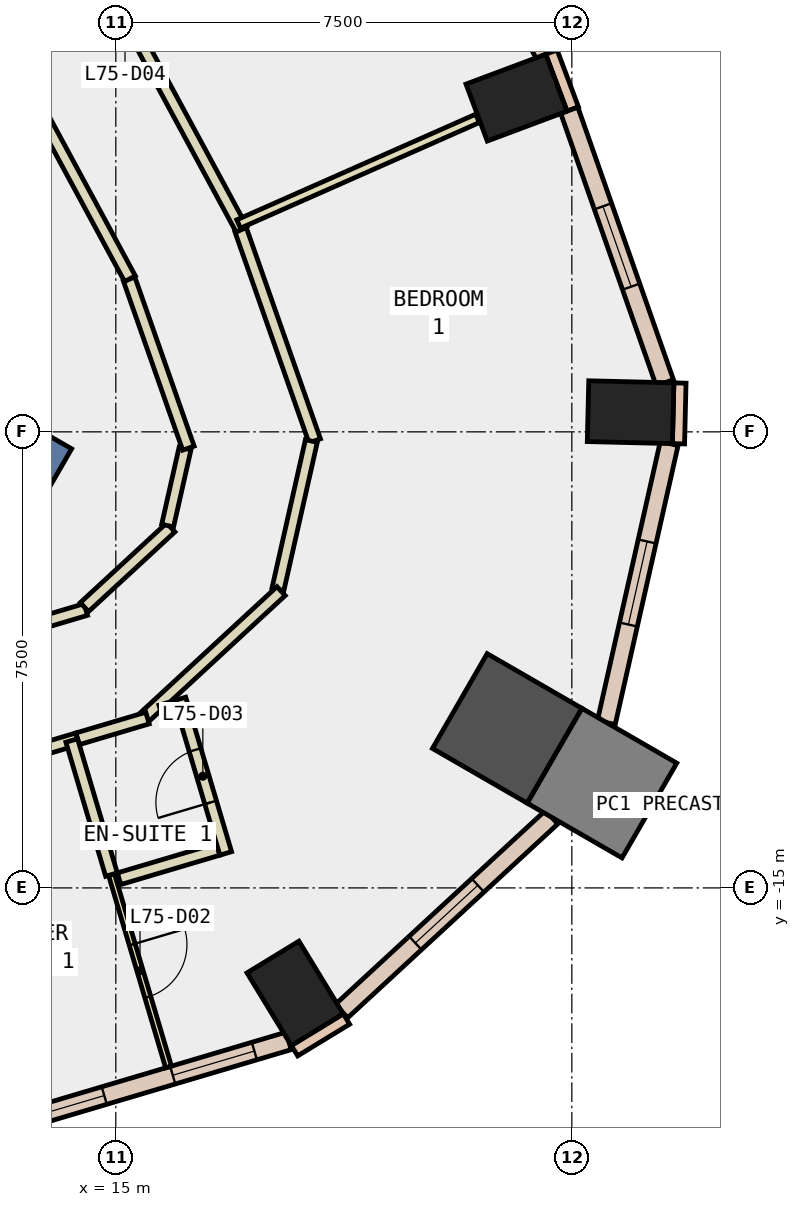
"""IFC4 building model, lengths in metres.
Left out: names, types, materials, properties, quantities, classifications, styles, units other than length and angle.
Written with IfcOpenShell. Run it as: python <this file> out.ifc"""

import sys

from ifc_helpers import new_model, si_unit, direction, frame, frame_2d, origin, origin_2d, place, context, subcontext, project, spatial, rectangle, extrude, element, fill, save


model = new_model("IFC4")
c1 = context("Model", 3, precision=1e-05, world=origin(), true_north=direction((0.0, 1.0)))
c2 = subcontext(c1, "Body", "Model", "MODEL_VIEW")
j1 = project(units=[si_unit("LENGTHUNIT", "METRE"), si_unit("PLANEANGLEUNIT", "RADIAN")], contexts=[c1])
p1 = place(None, origin())
s1 = spatial("IfcSite", under=j1, at=p1, CompositionType="ELEMENT")
p2 = place(p1, origin())
s2 = spatial("IfcBuilding", under=s1, at=p2, CompositionType="ELEMENT")
p3 = place(p2, frame((0.0, 0.0, 318.8)))
s3 = spatial("IfcBuildingStorey", under=s2, at=p3, CompositionType="ELEMENT", Elevation=318.8)
p4 = place(p3, frame((17.949, -16.734, -0.34), z_axis=(0.0, 0.0, 1.0), x_axis=(0.853650808213, 0.520845752251, 0.0)))
e1 = element("IfcColumn", 1, at=p4, inside=s3, PredefinedType="COLUMN", context=c2, shape_type="SweptSolid", body=[
    extrude(rectangle(XDim=1.0, YDim=1.4, at=origin_2d()), origin(), (0.0, 0.0, 1.0), 3.6),
])
p5 = place(p3, frame((21.437, -12.377, -0.34), z_axis=(0.0, 0.0, 1.0), x_axis=(-0.866025403784, 0.5, 0.0)))
e2 = element("IfcColumn", 2, at=p5, inside=s3, PredefinedType="COLUMN", context=c2, shape_type="SweptSolid", body=[
    extrude(rectangle(XDim=1.8, YDim=1.8, at=origin_2d()), origin(), (0.0, 0.0, 1.0), 3.6),
])
for number, where, z_axis, x_axis in (
    (3, (23.466, -7.177, -0.34), (0.0, 0.0, 1.0), (0.024, 1.0, 0.0)),
    (4, (21.59, -2.004, -0.34), (0.0, 0.0, 1.0), (-0.351, 0.936, 0.0)),
):
    element("IfcColumn", number, at=place(p3, frame(where, z_axis=z_axis, x_axis=x_axis)), inside=s3, PredefinedType="COLUMN", context=c2, shape_type="SweptSolid", body=[
        extrude(rectangle(XDim=1.0, YDim=1.4, at=origin_2d()), origin(), (0.0, 0.0, 1.0), 3.6),
    ])
p6 = place(p3, frame((22.996, -13.277, -0.34), z_axis=(0.0, 0.0, 1.0), x_axis=(-0.866025403784, 0.5, 0.0)))
e5 = element("IfcColumn", 5, at=p6, inside=s3, PredefinedType="COLUMN", context=c2, shape_type="SweptSolid", body=[
    extrude(rectangle(XDim=1.8, YDim=1.8, at=origin_2d()), origin(), (0.0, 0.0, 1.0), 3.6),
])
p7 = place(p3, frame((6.279, -3.625, -0.34), z_axis=(0.0, 0.0, 1.0), x_axis=(0.866017533419, -0.500013631625, 0.0)))
e6 = element("IfcWall", 6, at=p7, inside=s3, PredefinedType="SHEAR", context=c2, shape_type="SweptSolid", body=[
    extrude(rectangle(XDim=9.0, YDim=0.8, at=frame_2d((4.5, 0.0))), origin(), (0.0, 0.0, 1.0), 3.6),
])
p8 = place(p3, frame((22.515, -2.191, 0.0), z_axis=(0.0, 0.0, 1.0), x_axis=(-0.350962844851, 0.936389385637, 0.0)))
e7 = element("IfcWall", 7, at=p8, inside=s3, PredefinedType="STANDARD", context=c2, shape_type="SweptSolid", body=[
    extrude(rectangle(XDim=1.0, YDim=0.2, at=frame_2d((0.5, 0.0))), origin(), (0.0, 0.0, 1.0), 3.26),
])
p9 = place(p3, frame((17.939, -17.677, 0.0), z_axis=(0.0, 0.0, 1.0), x_axis=(0.853679739553, 0.520798331677, 0.0)))
e8 = element("IfcWall", 8, at=p9, inside=s3, PredefinedType="STANDARD", context=c2, shape_type="SweptSolid", body=[
    extrude(rectangle(XDim=1.0, YDim=0.2, at=frame_2d((0.5, 0.0))), origin(), (0.0, 0.0, 1.0), 3.26),
])
p10 = place(p3, frame((24.254, -7.696, 0.0), z_axis=(0.0, 0.0, 1.0), x_axis=(0.024186470916, 0.999707464524, 0.0)))
e9 = element("IfcWall", 9, at=p10, inside=s3, PredefinedType="STANDARD", context=c2, shape_type="SweptSolid", body=[
    extrude(rectangle(XDim=0.999, YDim=0.2, at=frame_2d((0.5, 0.0))), origin(), (0.0, 0.0, 1.0), 3.26),
])
p11 = place(p3, frame((12.904, -18.98, 0.0), z_axis=(0.0, 0.0, 1.0), x_axis=(0.958757933751, 0.284223898486, 0.0)))
e10 = element("IfcWall", 10, at=p11, inside=s3, PredefinedType="STANDARD", context=c2, shape_type="SweptSolid", body=[
    extrude(rectangle(XDim=5.15, YDim=0.3, at=frame_2d((2.575, 0.0))), origin(), (0.0, 0.0, 1.0), 3.26),
])
p12 = place(p11, frame((0.588, 0.0, 0.9)))
e11 = element("IfcOpeningElement", 11, at=p12, cuts=e10, PredefinedType="OPENING", context=c2, shape_type="SweptSolid", body=[
    extrude(rectangle(XDim=1.4, YDim=2.0, at=frame_2d((0.7, 1.0))), frame((0.0, 0.16, 0.0), z_axis=(0.0, -1.0, 0.0), x_axis=(1.0, 0.0, 0.0)), (0.0, 0.0, 1.0), 0.32),
])
p13 = place(p11, frame((3.163, 0.0, 0.9)))
e12 = element("IfcOpeningElement", 12, at=p13, cuts=e10, PredefinedType="OPENING", context=c2, shape_type="SweptSolid", body=[
    extrude(rectangle(XDim=1.4, YDim=2.0, at=frame_2d((0.7, 1.0))), frame((0.0, 0.16, 0.0), z_axis=(0.0, -1.0, 0.0), x_axis=(1.0, 0.0, 0.0)), (0.0, 0.0, 1.0), 0.32),
])
p14 = place(p3, frame((18.712, -17.026, 0.0), z_axis=(0.0, 0.0, 1.0), x_axis=(0.734934798699, 0.678137774838, 0.0)))
e13 = element("IfcWall", 13, at=p14, inside=s3, PredefinedType="STANDARD", context=c2, shape_type="SweptSolid", body=[
    extrude(rectangle(XDim=4.703, YDim=0.3, at=frame_2d((2.351, 0.0))), origin(), (0.0, 0.0, 1.0), 3.26),
])
p15 = place(p14, frame((1.651, 0.0, 0.9)))
e14 = element("IfcOpeningElement", 14, at=p15, cuts=e13, PredefinedType="OPENING", context=c2, shape_type="SweptSolid", body=[
    extrude(rectangle(XDim=1.4, YDim=2.0, at=frame_2d((0.7, 1.0))), frame((0.0, 0.16, 0.0), z_axis=(0.0, -1.0, 0.0), x_axis=(1.0, 0.0, 0.0)), (0.0, 0.0, 1.0), 0.32),
])
p16 = place(p3, frame((23.067, -12.28, 0.0), z_axis=(0.0, 0.0, 1.0), x_axis=(0.219886442412, 0.975525475036, 0.0)))
e15 = element("IfcWall", 15, at=p16, inside=s3, PredefinedType="STANDARD", context=c2, shape_type="SweptSolid", body=[
    extrude(rectangle(XDim=4.703, YDim=0.3, at=frame_2d((2.352, 0.0))), origin(), (0.0, 0.0, 1.0), 3.26),
])
p17 = place(p16, frame((1.652, 0.0, 0.9)))
e16 = element("IfcOpeningElement", 16, at=p17, cuts=e15, PredefinedType="OPENING", context=c2, shape_type="SweptSolid", body=[
    extrude(rectangle(XDim=1.4, YDim=2.0, at=frame_2d((0.7, 1.0))), frame((0.0, 0.16, 0.0), z_axis=(0.0, -1.0, 0.0), x_axis=(1.0, 0.0, 0.0)), (0.0, 0.0, 1.0), 0.32),
])
p18 = place(p3, frame((24.029, -6.692, 0.0), z_axis=(0.0, 0.0, 1.0), x_axis=(-0.330923030855, 0.943657749213, 0.0)))
e17 = element("IfcWall", 17, at=p18, inside=s3, PredefinedType="STANDARD", context=c2, shape_type="SweptSolid", body=[
    extrude(rectangle(XDim=4.748, YDim=0.3, at=frame_2d((2.374, 0.0))), origin(), (0.0, 0.0, 1.0), 3.26),
])
p19 = place(p18, frame((1.674, 0.0, 0.9)))
e18 = element("IfcOpeningElement", 18, at=p19, cuts=e17, PredefinedType="OPENING", context=c2, shape_type="SweptSolid", body=[
    extrude(rectangle(XDim=1.4, YDim=2.0, at=frame_2d((0.7, 1.0))), frame((0.0, 0.16, 0.0), z_axis=(0.0, -1.0, 0.0), x_axis=(1.0, 0.0, 0.0)), (0.0, 0.0, 1.0), 0.32),
])
p20 = place(p3, frame((22.052, -1.298, 0.0), z_axis=(0.0, 0.0, 1.0), x_axis=(-0.475690331633, 0.879612817319, 0.0)))
e19 = element("IfcWall", 19, at=p20, inside=s3, PredefinedType="STANDARD", context=c2, shape_type="SweptSolid", body=[
    extrude(rectangle(XDim=7.484, YDim=0.3, at=frame_2d((3.742, 0.0))), origin(), (0.0, 0.0, 1.0), 3.26),
])
p21 = place(p20, frame((0.771, 0.0, 0.9)))
e20 = element("IfcOpeningElement", 20, at=p21, cuts=e19, PredefinedType="OPENING", context=c2, shape_type="SweptSolid", body=[
    extrude(rectangle(XDim=2.2, YDim=2.0, at=frame_2d((1.1, 1.0))), frame((0.0, 0.16, 0.0), z_axis=(0.0, -1.0, 0.0), x_axis=(1.0, 0.0, 0.0)), (0.0, 0.0, 1.0), 0.32),
])
p22 = place(p20, frame((4.513, 0.0, 0.9)))
e21 = element("IfcOpeningElement", 21, at=p22, cuts=e19, PredefinedType="OPENING", context=c2, shape_type="SweptSolid", body=[
    extrude(rectangle(XDim=2.2, YDim=2.0, at=frame_2d((1.1, 1.0))), frame((0.0, 0.16, 0.0), z_axis=(0.0, -1.0, 0.0), x_axis=(1.0, 0.0, 0.0)), (0.0, 0.0, 1.0), 0.32),
])
p23 = place(p3, frame((11.076, -11.439, 0.0), z_axis=(0.0, 0.0, 1.0), x_axis=(0.958760241353, 0.284216114252, 0.0)))
e22 = element("IfcWall", 22, at=p23, inside=s3, PredefinedType="PARTITIONING", context=c2, shape_type="SweptSolid", body=[
    extrude(rectangle(XDim=3.578, YDim=0.2, at=frame_2d((1.789, 0.0))), origin(), (0.0, 0.0, 1.0), 3.26),
])
p24 = place(p3, frame((14.484, -10.382, 0.0), z_axis=(0.0, 0.0, 1.0), x_axis=(0.735026247728, 0.678038653139, 0.0)))
e23 = element("IfcWall", 23, at=p24, inside=s3, PredefinedType="PARTITIONING", context=c2, shape_type="SweptSolid", body=[
    extrude(rectangle(XDim=1.932, YDim=0.2, at=frame_2d((0.966, 0.0))), origin(), (0.0, 0.0, 1.0), 3.26),
])
p25 = place(p3, frame((15.852, -9.042, 0.0), z_axis=(0.0, 0.0, 1.0), x_axis=(0.220324178782, 0.975426704701, 0.0)))
e24 = element("IfcWall", 24, at=p25, inside=s3, PredefinedType="PARTITIONING", context=c2, shape_type="SweptSolid", body=[
    extrude(rectangle(XDim=1.302, YDim=0.2, at=frame_2d((0.651, 0.0))), origin(), (0.0, 0.0, 1.0), 3.26),
])
p26 = place(p3, frame((16.194, -7.768, 0.0), z_axis=(0.0, 0.0, 1.0), x_axis=(-0.330981563235, 0.943637220969, 0.0)))
e25 = element("IfcWall", 25, at=p26, inside=s3, PredefinedType="PARTITIONING", context=c2, shape_type="SweptSolid", body=[
    extrude(rectangle(XDim=2.946, YDim=0.2, at=frame_2d((1.473, 0.0))), origin(), (0.0, 0.0, 1.0), 3.26),
])
p27 = place(p3, frame((15.233, -4.982, 0.0), z_axis=(0.0, 0.0, 1.0), x_axis=(-0.475643534049, 0.879638123615, 0.0)))
e26 = element("IfcWall", 26, at=p27, inside=s3, PredefinedType="PARTITIONING", context=c2, shape_type="SweptSolid", body=[
    extrude(rectangle(XDim=7.871, YDim=0.2, at=frame_2d((3.936, 0.0))), origin(), (0.0, 0.0, 1.0), 3.26),
])
p28 = place(p27, frame((3.036, 0.0, 0.0)))
e27 = element("IfcOpeningElement", 27, at=p28, cuts=e26, PredefinedType="OPENING", context=c2, shape_type="SweptSolid", body=[
    extrude(rectangle(XDim=1.8, YDim=2.1, at=frame_2d((0.9, 1.05))), frame((0.0, 0.11, 0.0), z_axis=(0.0, -1.0, 0.0), x_axis=(1.0, 0.0, 0.0)), (0.0, 0.0, 1.0), 0.22),
])
p29 = place(p3, frame((14.371, -12.548, 0.0), z_axis=(0.0, 0.0, 1.0), x_axis=(-0.958773475867, -0.284171465799, 0.0)))
e28 = element("IfcWall", 28, at=p29, inside=s3, PredefinedType="PARTITIONING", context=c2, shape_type="SweptSolid", body=[
    extrude(rectangle(XDim=2.9, YDim=0.2, at=frame_2d((1.45, 0.0))), origin(), (0.0, 0.0, 1.0), 3.26),
])
p30 = place(p29, frame((0.95, 0.0, 0.0)))
e29 = element("IfcOpeningElement", 29, at=p30, cuts=e28, PredefinedType="OPENING", context=c2, shape_type="SweptSolid", body=[
    extrude(rectangle(XDim=1.0, YDim=2.1, at=frame_2d((0.5, 1.05))), frame((0.0, 0.11, 0.0), z_axis=(0.0, -1.0, 0.0), x_axis=(1.0, 0.0, 0.0)), (0.0, 0.0, 1.0), 0.22),
])
p31 = place(p3, frame((17.053, -4.177, 0.0), z_axis=(0.0, 0.0, 1.0), x_axis=(0.33112192567, -0.943587977001, 0.0)))
e30 = element("IfcWall", 30, at=p31, inside=s3, PredefinedType="PARTITIONING", context=c2, shape_type="SweptSolid", body=[
    extrude(rectangle(XDim=3.678, YDim=0.2, at=frame_2d((1.839, 0.0))), origin(), (0.0, 0.0, 1.0), 3.26),
])
p32 = place(p3, frame((18.216, -7.651, 0.0), z_axis=(0.0, 0.0, 1.0), x_axis=(-0.219979161162, -0.975504571314, 0.0)))
e31 = element("IfcWall", 31, at=p32, inside=s3, PredefinedType="PARTITIONING", context=c2, shape_type="SweptSolid", body=[
    extrude(rectangle(XDim=2.5, YDim=0.2, at=frame_2d((1.25, 0.0))), origin(), (0.0, 0.0, 1.0), 3.26),
])
p33 = place(p3, frame((17.718, -10.119, 0.0), z_axis=(0.0, 0.0, 1.0), x_axis=(-0.734673909713, -0.678420405344, 0.0)))
e32 = element("IfcWall", 32, at=p33, inside=s3, PredefinedType="PARTITIONING", context=c2, shape_type="SweptSolid", body=[
    extrude(rectangle(XDim=3.107, YDim=0.2, at=frame_2d((1.554, 0.0))), origin(), (0.0, 0.0, 1.0), 3.26),
])
p34 = place(p3, frame((15.521, -12.207, 0.0), z_axis=(0.0, 0.0, 1.0), x_axis=(-0.958717989575, -0.2843586054, 0.0)))
e33 = element("IfcWall", 33, at=p34, inside=s3, PredefinedType="PARTITIONING", context=c2, shape_type="SweptSolid", body=[
    extrude(rectangle(XDim=1.199, YDim=0.2, at=frame_2d((0.6, 0.0))), origin(), (0.0, 0.0, 1.0), 3.26),
])
p35 = place(p3, frame((13.235, 2.918, 0.0), z_axis=(0.0, 0.0, 1.0), x_axis=(0.475681790703, -0.879617436158, 0.0)))
e34 = element("IfcWall", 34, at=p35, inside=s3, PredefinedType="PARTITIONING", context=c2, shape_type="SweptSolid", body=[
    extrude(rectangle(XDim=8.058, YDim=0.2, at=frame_2d((4.029, 0.0))), origin(), (0.0, 0.0, 1.0), 3.26),
])
p36 = place(p35, frame((3.529, 0.0, 0.0)))
e35 = element("IfcOpeningElement", 35, at=p36, cuts=e34, PredefinedType="OPENING", context=c2, shape_type="SweptSolid", body=[
    extrude(rectangle(XDim=1.0, YDim=2.1, at=frame_2d((0.5, 1.05))), frame((0.0, 0.11, 0.0), z_axis=(0.0, -1.0, 0.0), x_axis=(1.0, 0.0, 0.0)), (0.0, 0.0, 1.0), 0.22),
])
p37 = place(p3, frame((14.929, -14.781, 0.0), z_axis=(0.0, 0.0, 1.0), x_axis=(0.284224342284, -0.958757802186, 0.0)))
e36 = element("IfcWall", 36, at=p37, inside=s3, PredefinedType="PARTITIONING", context=c2, shape_type="SweptSolid", body=[
    extrude(rectangle(XDim=3.3, YDim=0.1, at=frame_2d((1.65, 0.0))), origin(), (0.0, 0.0, 1.0), 3.26),
])
p38 = place(p37, frame((1.2, 0.0, 0.0)))
e37 = element("IfcOpeningElement", 37, at=p38, cuts=e36, PredefinedType="OPENING", context=c2, shape_type="SweptSolid", body=[
    extrude(rectangle(XDim=0.9, YDim=2.1, at=frame_2d((0.45, 1.05))), frame((0.0, 0.06, 0.0), z_axis=(0.0, -1.0, 0.0), x_axis=(1.0, 0.0, 0.0)), (0.0, 0.0, 1.0), 0.12),
])
p39 = place(p3, frame((14.275, -12.576, 0.0), z_axis=(0.0, 0.0, 1.0), x_axis=(0.284366601045, -0.958715618007, 0.0)))
e38 = element("IfcWall", 38, at=p39, inside=s3, PredefinedType="PARTITIONING", context=c2, shape_type="SweptSolid", body=[
    extrude(rectangle(XDim=2.3, YDim=0.2, at=frame_2d((1.15, 0.0))), origin(), (0.0, 0.0, 1.0), 3.26),
])
p40 = place(p3, frame((15.054, -14.849, 0.0), z_axis=(0.0, 0.0, 1.0), x_axis=(0.958727061754, 0.284328016666, 0.0)))
e39 = element("IfcWall", 39, at=p40, inside=s3, PredefinedType="PARTITIONING", context=c2, shape_type="SweptSolid", body=[
    extrude(rectangle(XDim=1.699, YDim=0.2, at=frame_2d((0.85, 0.0))), origin(), (0.0, 0.0, 1.0), 3.26),
])
p41 = place(p3, frame((16.808, -14.433, 0.0), z_axis=(0.0, 0.0, 1.0), x_axis=(-0.284524220245, 0.958668852156, 0.0)))
e40 = element("IfcWall", 40, at=p41, inside=s3, PredefinedType="PARTITIONING", context=c2, shape_type="SweptSolid", body=[
    extrude(rectangle(XDim=2.651, YDim=0.2, at=frame_2d((1.325, 0.0))), origin(), (0.0, 0.0, 1.0), 3.26),
])
p42 = place(p41, frame((0.875, 0.0, 0.0)))
e41 = element("IfcOpeningElement", 41, at=p42, cuts=e40, PredefinedType="OPENING", context=c2, shape_type="SweptSolid", body=[
    extrude(rectangle(XDim=0.9, YDim=2.1, at=frame_2d((0.45, 1.05))), frame((0.0, 0.11, 0.0), z_axis=(0.0, -1.0, 0.0), x_axis=(1.0, 0.0, 0.0)), (0.0, 0.0, 1.0), 0.22),
])
p43 = place(p3, frame((15.987, -12.017, 0.0), z_axis=(0.0, 0.0, 1.0), x_axis=(-0.958598776535, -0.284760224794, 0.0)))
e42 = element("IfcWall", 42, at=p43, inside=s3, PredefinedType="PARTITIONING", context=c2, shape_type="SweptSolid", body=[
    extrude(rectangle(XDim=0.26, YDim=0.2, at=frame_2d((0.13, 0.0))), origin(), (0.0, 0.0, 1.0), 3.26),
])
p44 = place(p3, frame((17.02, -4.082, 0.0), z_axis=(0.0, 0.0, 1.0), x_axis=(0.914599611743, 0.404360668462, 0.0)))
e43 = element("IfcWall", 43, at=p44, inside=s3, PredefinedType="PARTITIONING", context=c2, shape_type="SweptSolid", body=[
    extrude(rectangle(XDim=4.296, YDim=0.15, at=frame_2d((2.148, 0.0))), origin(), (0.0, 0.0, 1.0), 3.26),
])
p45 = place(p12, origin())
e44 = element("IfcWindow", 44, at=p45, inside=s3, PartitioningType="SINGLE_PANEL", PredefinedType="WINDOW", context=c2, shape_type="SweptSolid", body=[
    extrude(rectangle(XDim=1.4, YDim=2.0, at=frame_2d((0.7, 1.0))), frame((0.0, 0.03, 0.0), z_axis=(0.0, -1.0, 0.0), x_axis=(1.0, 0.0, 0.0)), (0.0, 0.0, 1.0), 0.06),
])
fill(e11, e44)
p46 = place(p13, origin())
e45 = element("IfcWindow", 45, at=p46, inside=s3, PartitioningType="SINGLE_PANEL", PredefinedType="WINDOW", context=c2, shape_type="SweptSolid", body=[
    extrude(rectangle(XDim=1.4, YDim=2.0, at=frame_2d((0.7, 1.0))), frame((0.0, 0.03, 0.0), z_axis=(0.0, -1.0, 0.0), x_axis=(1.0, 0.0, 0.0)), (0.0, 0.0, 1.0), 0.06),
])
fill(e12, e45)
p47 = place(p15, origin())
e46 = element("IfcWindow", 46, at=p47, inside=s3, PartitioningType="SINGLE_PANEL", PredefinedType="WINDOW", context=c2, shape_type="SweptSolid", body=[
    extrude(rectangle(XDim=1.4, YDim=2.0, at=frame_2d((0.7, 1.0))), frame((0.0, 0.03, 0.0), z_axis=(0.0, -1.0, 0.0), x_axis=(1.0, 0.0, 0.0)), (0.0, 0.0, 1.0), 0.06),
])
fill(e14, e46)
p48 = place(p17, origin())
e47 = element("IfcWindow", 47, at=p48, inside=s3, PartitioningType="SINGLE_PANEL", PredefinedType="WINDOW", context=c2, shape_type="SweptSolid", body=[
    extrude(rectangle(XDim=1.4, YDim=2.0, at=frame_2d((0.7, 1.0))), frame((0.0, 0.03, 0.0), z_axis=(0.0, -1.0, 0.0), x_axis=(1.0, 0.0, 0.0)), (0.0, 0.0, 1.0), 0.06),
])
fill(e16, e47)
p49 = place(p19, origin())
e48 = element("IfcWindow", 48, at=p49, inside=s3, PartitioningType="SINGLE_PANEL", PredefinedType="WINDOW", context=c2, shape_type="SweptSolid", body=[
    extrude(rectangle(XDim=1.4, YDim=2.0, at=frame_2d((0.7, 1.0))), frame((0.0, 0.03, 0.0), z_axis=(0.0, -1.0, 0.0), x_axis=(1.0, 0.0, 0.0)), (0.0, 0.0, 1.0), 0.06),
])
fill(e18, e48)
p50 = place(p38, origin())
e49 = element("IfcDoor", 49, at=p50, inside=s3, OperationType="SINGLE_SWING_LEFT", PredefinedType="DOOR", context=c2, shape_type="SweptSolid", body=[
    extrude(rectangle(XDim=0.9, YDim=2.1, at=frame_2d((0.45, 1.05))), frame((0.0, 0.025, 0.0), z_axis=(0.0, -1.0, 0.0), x_axis=(1.0, 0.0, 0.0)), (0.0, 0.0, 1.0), 0.05),
])
fill(e37, e49)
p51 = place(p42, origin())
e50 = element("IfcDoor", 50, at=p51, inside=s3, OperationType="SINGLE_SWING_LEFT", PredefinedType="DOOR", context=c2, shape_type="SweptSolid", body=[
    extrude(rectangle(XDim=0.9, YDim=2.1, at=frame_2d((0.45, 1.05))), frame((0.0, 0.025, 0.0), z_axis=(0.0, -1.0, 0.0), x_axis=(1.0, 0.0, 0.0)), (0.0, 0.0, 1.0), 0.05),
])
fill(e41, e50)
save(model, sys.argv[1])
